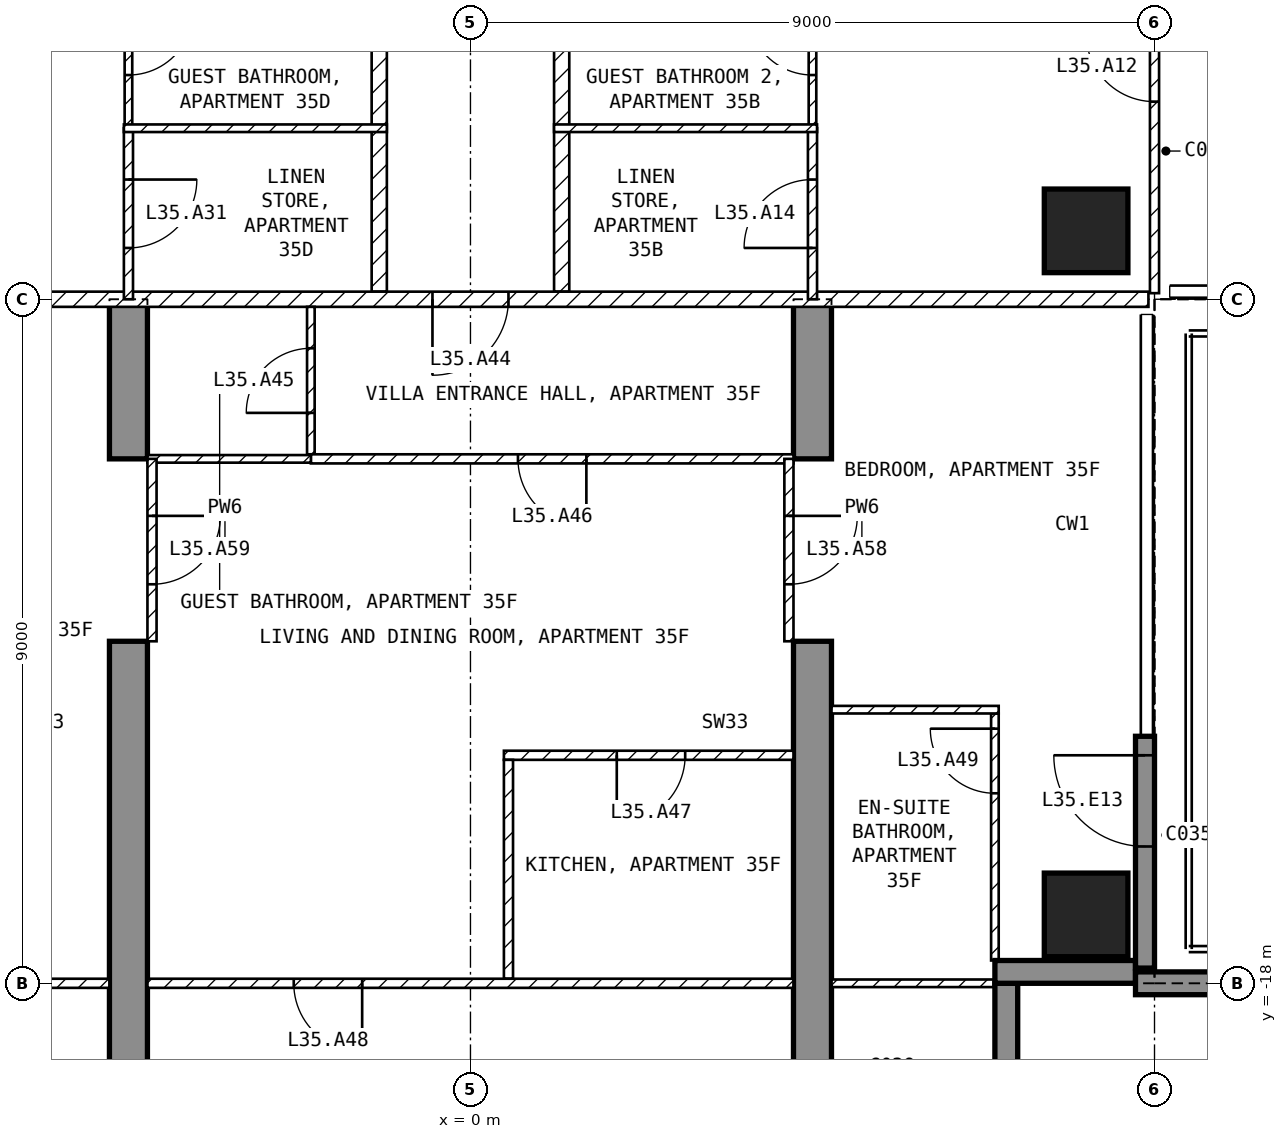
"""IFC4 building model, lengths in metres.
Left out: names, types, materials, properties, quantities, classifications, styles, units other than length and angle.
Written with IfcOpenShell. Run it as: python <this file> out.ifc"""

import sys

from ifc_helpers import new_model, si_unit, direction, frame, frame_2d, origin, origin_2d, place, context, subcontext, project, spatial, polyline, rectangle, outline, extrude, element, fill, save


model = new_model("IFC4")
c1 = context("Model", 3, precision=1e-05, world=origin(), true_north=direction((0.0, 1.0)))
c2 = subcontext(c1, "Body", "Model", "MODEL_VIEW")
j1 = project(units=[si_unit("LENGTHUNIT", "METRE"), si_unit("PLANEANGLEUNIT", "RADIAN")], contexts=[c1])
p1 = place(None, origin())
s1 = spatial("IfcSite", under=j1, at=p1, CompositionType="ELEMENT")
p2 = place(p1, origin())
s2 = spatial("IfcBuilding", under=s1, at=p2, CompositionType="ELEMENT")
p3 = place(p2, frame((0.0, 0.0, 144.4)))
s3 = spatial("IfcBuildingStorey", under=s2, at=p3, CompositionType="ELEMENT", Elevation=144.4)
for number, where, z_axis, x_axis in (
    (1, (8.1, -17.1, -0.25), (0.0, 0.0, 1.0), (1.0, 0.0, 0.0)),
    (2, (8.1, -8.1, -0.25), (0.0, 0.0, 1.0), (1.0, 0.0, 0.0)),
):
    element("IfcColumn", number, at=place(p3, frame(where, z_axis=z_axis, x_axis=x_axis)), inside=s3, PredefinedType="COLUMN", context=c2, shape_type="SweptSolid", body=[
        extrude(rectangle(XDim=1.1, YDim=1.1, at=origin_2d()), origin(), (0.0, 0.0, 1.0), 3.5),
    ])
for number, where, z_axis, x_axis in (
    (3, (-4.75, -20.15, -0.25), (1.0, 0.0, 0.0), (0.0, 1.0, 0.0)),
    (4, (4.25, -20.15, -0.25), (1.0, 0.0, 0.0), (0.0, 1.0, 0.0)),
):
    element("IfcWall", number, at=place(p3, frame(where, z_axis=z_axis, x_axis=x_axis)), inside=s3, PredefinedType="SHEAR", context=c2, shape_type="SweptSolid", body=[
        extrude(outline(polyline([(0.0, 0.0), (6.65, 0.0), (6.65, 2.65), (9.05, 2.65), (9.05, 0.0), (11.15, 0.0), (11.15, 3.5), (0.0, 3.5), (0.0, 0.0)])), origin(), (0.0, 0.0, 1.0), 0.5),
    ])
p4 = place(p3, frame((8.875, -17.8, 0.0), z_axis=(0.0, 0.0, 1.0), x_axis=(0.0, 1.0, 0.0)))
e5 = element("IfcWall", 5, at=p4, inside=s3, PredefinedType="SOLIDWALL", context=c2, shape_type="SweptSolid", body=[
    extrude(rectangle(XDim=3.05, YDim=0.25, at=frame_2d((1.525, 0.0))), origin(), (0.0, 0.0, 1.0), 3.25),
])
p5 = place(p4, frame((1.6, 0.0, 0.0)))
e6 = element("IfcOpeningElement", 6, at=p5, cuts=e5, PredefinedType="OPENING", context=c2, shape_type="SweptSolid", body=[
    extrude(rectangle(XDim=1.2, YDim=2.4, at=frame_2d((0.6, 1.2))), frame((0.0, 0.135, 0.0), z_axis=(0.0, -1.0, 0.0), x_axis=(1.0, 0.0, 0.0)), (0.0, 0.0, 1.0), 0.27),
])
p6 = place(p3, frame((7.05, -19.8, 0.0), z_axis=(0.0, 0.0, 1.0), x_axis=(0.0, 1.0, 0.0)))
e7 = element("IfcWall", 7, at=p6, inside=s3, PredefinedType="SOLIDWALL", context=c2, shape_type="SweptSolid", body=[
    extrude(rectangle(XDim=1.8, YDim=0.3, at=frame_2d((0.9, 0.0))), origin(), (0.0, 0.0, 1.0), 3.25),
])
p7 = place(p3, frame((6.9, -17.85, 0.0), z_axis=(0.0, 0.0, 1.0), x_axis=(1.0, 0.0, 0.0)))
e8 = element("IfcWall", 8, at=p7, inside=s3, PredefinedType="SOLIDWALL", context=c2, shape_type="SweptSolid", body=[
    extrude(rectangle(XDim=1.85, YDim=0.3, at=frame_2d((0.925, 0.0))), origin(), (0.0, 0.0, 1.0), 3.25),
])
p8 = place(p3, frame((8.75, -18.0, 0.0), z_axis=(0.0, 0.0, 1.0), x_axis=(1.0, 0.0, 0.0)))
e9 = element("IfcWall", 9, at=p8, inside=s3, PredefinedType="SOLIDWALL", context=c2, shape_type="SweptSolid", body=[
    extrude(rectangle(XDim=2.99, YDim=0.3, at=frame_2d((1.495, 0.0))), origin(), (0.0, 0.0, 1.0), 3.25),
])
for number, where, z_axis, x_axis in (
    (10, (1.2, -4.6, 0.0), (0.0, 0.0, 1.0), (0.0, -1.0, 0.0)),
    (11, (-1.2, -8.9, 0.0), (0.0, 0.0, 1.0), (0.0, 1.0, 0.0)),
):
    element("IfcWall", number, at=place(p3, frame(where, z_axis=z_axis, x_axis=x_axis)), inside=s3, PredefinedType="PARTITIONING", context=c2, shape_type="SweptSolid", body=[
        extrude(rectangle(XDim=4.3, YDim=0.2, at=frame_2d((2.15, 0.0))), origin(), (0.0, 0.0, 1.0), 3.25),
    ])
p9 = place(p3, frame((8.92, -9.0, 0.0), z_axis=(0.0, 0.0, 1.0), x_axis=(-1.0, 0.0, 0.0)))
e12 = element("IfcWall", 12, at=p9, inside=s3, PredefinedType="PARTITIONING", context=c2, shape_type="SweptSolid", body=[
    extrude(rectangle(XDim=17.84, YDim=0.2, at=frame_2d((8.92, 0.0))), origin(), (0.0, 0.0, 1.0), 3.25),
])
p10 = place(p9, frame((8.42, 0.0, 0.0)))
e13 = element("IfcOpeningElement", 13, at=p10, cuts=e12, PredefinedType="OPENING", context=c2, shape_type="SweptSolid", body=[
    extrude(rectangle(XDim=1.0, YDim=2.1, at=frame_2d((0.5, 1.05))), frame((0.0, 0.11, 0.0), z_axis=(0.0, -1.0, 0.0), x_axis=(1.0, 0.0, 0.0)), (0.0, 0.0, 1.0), 0.22),
])
p11 = place(p3, frame((9.0, -8.92, 0.0), z_axis=(0.0, 0.0, 1.0), x_axis=(0.0, 1.0, 0.0)))
e14 = element("IfcWall", 14, at=p11, inside=s3, PredefinedType="PARTITIONING", context=c2, shape_type="SweptSolid", body=[
    extrude(rectangle(XDim=7.62, YDim=0.12, at=frame_2d((3.81, 0.0))), origin(), (0.0, 0.0, 1.0), 3.25),
])
p12 = place(p11, frame((2.52, 0.0, 0.0)))
e15 = element("IfcOpeningElement", 15, at=p12, cuts=e14, PredefinedType="OPENING", context=c2, shape_type="SweptSolid", body=[
    extrude(rectangle(XDim=0.9, YDim=2.1, at=frame_2d((0.45, 1.05))), frame((0.0, 0.07, 0.0), z_axis=(0.0, -1.0, 0.0), x_axis=(1.0, 0.0, 0.0)), (0.0, 0.0, 1.0), 0.14),
])
p13 = place(p3, frame((4.5, -6.75, 0.0), z_axis=(0.0, 0.0, 1.0), x_axis=(0.0, 1.0, 0.0)))
e16 = element("IfcWall", 16, at=p13, inside=s3, PredefinedType="PARTITIONING", context=c2, shape_type="SweptSolid", body=[
    extrude(rectangle(XDim=2.25, YDim=0.1, at=frame_2d((1.125, 0.0))), origin(), (0.0, 0.0, 1.0), 3.25),
])
p14 = place(p13, frame((0.7, 0.0, 0.0)))
e17 = element("IfcOpeningElement", 17, at=p14, cuts=e16, PredefinedType="OPENING", context=c2, shape_type="SweptSolid", body=[
    extrude(rectangle(XDim=0.85, YDim=2.1, at=frame_2d((0.425, 1.05))), frame((0.0, 0.06, 0.0), z_axis=(0.0, -1.0, 0.0), x_axis=(1.0, 0.0, 0.0)), (0.0, 0.0, 1.0), 0.12),
])
p15 = place(p3, frame((4.5, -9.0, 0.0), z_axis=(0.0, 0.0, 1.0), x_axis=(0.0, 1.0, 0.0)))
e18 = element("IfcWall", 18, at=p15, inside=s3, PredefinedType="PARTITIONING", context=c2, shape_type="SweptSolid", body=[
    extrude(rectangle(XDim=2.25, YDim=0.12, at=frame_2d((1.125, 0.0))), origin(), (0.0, 0.0, 1.0), 3.25),
])
p16 = place(p15, frame((0.675, 0.0, 0.0)))
e19 = element("IfcOpeningElement", 19, at=p16, cuts=e18, PredefinedType="OPENING", context=c2, shape_type="SweptSolid", body=[
    extrude(rectangle(XDim=0.9, YDim=2.1, at=frame_2d((0.45, 1.05))), frame((0.0, 0.07, 0.0), z_axis=(0.0, -1.0, 0.0), x_axis=(1.0, 0.0, 0.0)), (0.0, 0.0, 1.0), 0.14),
])
p17 = place(p3, frame((4.56, -6.75, 0.0), z_axis=(0.0, 0.0, 1.0), x_axis=(-1.0, 0.0, 0.0)))
e20 = element("IfcWall", 20, at=p17, inside=s3, PredefinedType="PARTITIONING", context=c2, shape_type="SweptSolid", body=[
    extrude(rectangle(XDim=3.46, YDim=0.1, at=frame_2d((1.73, 0.0))), origin(), (0.0, 0.0, 1.0), 3.25),
])
p18 = place(p3, frame((-4.5, -4.5, 0.0), z_axis=(0.0, 0.0, 1.0), x_axis=(0.0, -1.0, 0.0)))
e21 = element("IfcWall", 21, at=p18, inside=s3, PredefinedType="PARTITIONING", context=c2, shape_type="SweptSolid", body=[
    extrude(rectangle(XDim=2.25, YDim=0.1, at=frame_2d((1.125, 0.0))), origin(), (0.0, 0.0, 1.0), 3.25),
])
p19 = place(p18, frame((0.7, 0.0, 0.0)))
e22 = element("IfcOpeningElement", 22, at=p19, cuts=e21, PredefinedType="OPENING", context=c2, shape_type="SweptSolid", body=[
    extrude(rectangle(XDim=0.85, YDim=2.1, at=frame_2d((0.425, 1.05))), frame((0.0, 0.06, 0.0), z_axis=(0.0, -1.0, 0.0), x_axis=(1.0, 0.0, 0.0)), (0.0, 0.0, 1.0), 0.12),
])
p20 = place(p3, frame((-4.5, -6.75, 0.0), z_axis=(0.0, 0.0, 1.0), x_axis=(0.0, -1.0, 0.0)))
e23 = element("IfcWall", 23, at=p20, inside=s3, PredefinedType="PARTITIONING", context=c2, shape_type="SweptSolid", body=[
    extrude(rectangle(XDim=2.25, YDim=0.12, at=frame_2d((1.125, 0.0))), origin(), (0.0, 0.0, 1.0), 3.25),
])
p21 = place(p20, frame((0.675, 0.0, 0.0)))
e24 = element("IfcOpeningElement", 24, at=p21, cuts=e23, PredefinedType="OPENING", context=c2, shape_type="SweptSolid", body=[
    extrude(rectangle(XDim=0.9, YDim=2.1, at=frame_2d((0.45, 1.05))), frame((0.0, 0.07, 0.0), z_axis=(0.0, -1.0, 0.0), x_axis=(1.0, 0.0, 0.0)), (0.0, 0.0, 1.0), 0.14),
])
p22 = place(p3, frame((-1.1, -6.75, 0.0), z_axis=(0.0, 0.0, 1.0), x_axis=(-1.0, 0.0, 0.0)))
e25 = element("IfcWall", 25, at=p22, inside=s3, PredefinedType="PARTITIONING", context=c2, shape_type="SweptSolid", body=[
    extrude(rectangle(XDim=3.46, YDim=0.1, at=frame_2d((1.73, 0.0))), origin(), (0.0, 0.0, 1.0), 3.25),
])
p23 = place(p3, frame((-2.1, -11.04, 0.0), z_axis=(0.0, 0.0, 1.0), x_axis=(0.0, 1.0, 0.0)))
e26 = element("IfcWall", 26, at=p23, inside=s3, PredefinedType="PARTITIONING", context=c2, shape_type="SweptSolid", body=[
    extrude(rectangle(XDim=1.94, YDim=0.1, at=frame_2d((0.97, 0.0))), origin(), (0.0, 0.0, 1.0), 3.25),
])
p24 = place(p23, frame((0.545, 0.0, 0.0)))
e27 = element("IfcOpeningElement", 27, at=p24, cuts=e26, PredefinedType="OPENING", context=c2, shape_type="SweptSolid", body=[
    extrude(rectangle(XDim=0.85, YDim=2.1, at=frame_2d((0.425, 1.05))), frame((0.0, 0.06, 0.0), z_axis=(0.0, -1.0, 0.0), x_axis=(1.0, 0.0, 0.0)), (0.0, 0.0, 1.0), 0.12),
])
p25 = place(p3, frame((4.25, -11.1, 0.0), z_axis=(0.0, 0.0, 1.0), x_axis=(-1.0, 0.0, 0.0)))
e28 = element("IfcWall", 28, at=p25, inside=s3, PredefinedType="PARTITIONING", context=c2, shape_type="SweptSolid", body=[
    extrude(rectangle(XDim=6.35, YDim=0.12, at=frame_2d((3.175, 0.0))), origin(), (0.0, 0.0, 1.0), 3.25),
])
p26 = place(p25, frame((2.725, 0.0, 0.0)))
e29 = element("IfcOpeningElement", 29, at=p26, cuts=e28, PredefinedType="OPENING", context=c2, shape_type="SweptSolid", body=[
    extrude(rectangle(XDim=0.9, YDim=2.1, at=frame_2d((0.45, 1.05))), frame((0.0, 0.07, 0.0), z_axis=(0.0, -1.0, 0.0), x_axis=(1.0, 0.0, 0.0)), (0.0, 0.0, 1.0), 0.14),
])
p27 = place(p3, frame((-2.1, -11.1, 0.0), z_axis=(0.0, 0.0, 1.0), x_axis=(-1.0, 0.0, 0.0)))
e30 = element("IfcWall", 30, at=p27, inside=s3, PredefinedType="PARTITIONING", context=c2, shape_type="SweptSolid", body=[
    extrude(rectangle(XDim=2.15, YDim=0.1, at=frame_2d((1.075, 0.0))), origin(), (0.0, 0.0, 1.0), 3.25),
])
p28 = place(p3, frame((4.25, -15.0, 0.0), z_axis=(0.0, 0.0, 1.0), x_axis=(-1.0, 0.0, 0.0)))
e31 = element("IfcWall", 31, at=p28, inside=s3, PredefinedType="PARTITIONING", context=c2, shape_type="SweptSolid", body=[
    extrude(rectangle(XDim=3.81, YDim=0.12, at=frame_2d((1.905, 0.0))), origin(), (0.0, 0.0, 1.0), 3.25),
])
p29 = place(p28, frame((1.425, 0.0, 0.0)))
e32 = element("IfcOpeningElement", 32, at=p29, cuts=e31, PredefinedType="OPENING", context=c2, shape_type="SweptSolid", body=[
    extrude(rectangle(XDim=0.9, YDim=2.1, at=frame_2d((0.45, 1.05))), frame((0.0, 0.07, 0.0), z_axis=(0.0, -1.0, 0.0), x_axis=(1.0, 0.0, 0.0)), (0.0, 0.0, 1.0), 0.14),
])
p30 = place(p3, frame((0.5, -15.06, 0.0), z_axis=(0.0, 0.0, 1.0), x_axis=(0.0, -1.0, 0.0)))
e33 = element("IfcWall", 33, at=p30, inside=s3, PredefinedType="PARTITIONING", context=c2, shape_type="SweptSolid", body=[
    extrude(rectangle(XDim=2.88, YDim=0.12, at=frame_2d((1.44, 0.0))), origin(), (0.0, 0.0, 1.0), 3.25),
])
p31 = place(p3, frame((4.25, -18.0, 0.0), z_axis=(0.0, 0.0, 1.0), x_axis=(-1.0, 0.0, 0.0)))
e34 = element("IfcWall", 34, at=p31, inside=s3, PredefinedType="PARTITIONING", context=c2, shape_type="SweptSolid", body=[
    extrude(rectangle(XDim=8.5, YDim=0.12, at=frame_2d((4.25, 0.0))), origin(), (0.0, 0.0, 1.0), 3.25),
])
p32 = place(p31, frame((5.675, 0.0, 0.0)))
e35 = element("IfcOpeningElement", 35, at=p32, cuts=e34, PredefinedType="OPENING", context=c2, shape_type="SweptSolid", body=[
    extrude(rectangle(XDim=0.9, YDim=2.1, at=frame_2d((0.45, 1.05))), frame((0.0, 0.07, 0.0), z_axis=(0.0, -1.0, 0.0), x_axis=(1.0, 0.0, 0.0)), (0.0, 0.0, 1.0), 0.14),
])
p33 = place(p3, frame((6.9, -17.7, 0.0), z_axis=(0.0, 0.0, 1.0), x_axis=(0.0, 1.0, 0.0)))
e36 = element("IfcWall", 36, at=p33, inside=s3, PredefinedType="PARTITIONING", context=c2, shape_type="SweptSolid", body=[
    extrude(rectangle(XDim=3.25, YDim=0.1, at=frame_2d((1.625, 0.0))), origin(), (0.0, 0.0, 1.0), 3.25),
])
p34 = place(p33, frame((2.2, 0.0, 0.0)))
e37 = element("IfcOpeningElement", 37, at=p34, cuts=e36, PredefinedType="OPENING", context=c2, shape_type="SweptSolid", body=[
    extrude(rectangle(XDim=0.85, YDim=2.1, at=frame_2d((0.425, 1.05))), frame((0.0, 0.06, 0.0), z_axis=(0.0, -1.0, 0.0), x_axis=(1.0, 0.0, 0.0)), (0.0, 0.0, 1.0), 0.12),
])
p35 = place(p3, frame((6.95, -14.4, 0.0), z_axis=(0.0, 0.0, 1.0), x_axis=(-1.0, 0.0, 0.0)))
e38 = element("IfcWall", 38, at=p35, inside=s3, PredefinedType="PARTITIONING", context=c2, shape_type="SweptSolid", body=[
    extrude(rectangle(XDim=2.2, YDim=0.1, at=frame_2d((1.1, 0.0))), origin(), (0.0, 0.0, 1.0), 3.25),
])
p36 = place(p3, frame((7.12, -18.0, 0.0), z_axis=(0.0, 0.0, 1.0), x_axis=(-1.0, 0.0, 0.0)))
e39 = element("IfcWall", 39, at=p36, inside=s3, PredefinedType="PARTITIONING", context=c2, shape_type="SweptSolid", body=[
    extrude(rectangle(XDim=2.37, YDim=0.1, at=frame_2d((1.185, 0.0))), origin(), (0.0, 0.0, 1.0), 3.25),
])
p37 = place(p3, frame((-4.75, -18.0, 0.0), z_axis=(0.0, 0.0, 1.0), x_axis=(-1.0, 0.0, 0.0)))
e40 = element("IfcWall", 40, at=p37, inside=s3, PredefinedType="PARTITIONING", context=c2, shape_type="SweptSolid", body=[
    extrude(rectangle(XDim=2.37, YDim=0.12, at=frame_2d((1.185, 0.0))), origin(), (0.0, 0.0, 1.0), 3.25),
])
p38 = place(p3, frame((4.19, -11.1, 0.0), z_axis=(0.0, 0.0, 1.0), x_axis=(0.0, -1.0, 0.0)))
e41 = element("IfcWall", 41, at=p38, inside=s3, PredefinedType="PARTITIONING", context=c2, shape_type="SweptSolid", body=[
    extrude(rectangle(XDim=2.4, YDim=0.12, at=frame_2d((1.2, 0.0))), origin(), (0.0, 0.0, 1.0), 2.4),
])
p39 = place(p38, frame((0.75, 0.0, 0.0)))
e42 = element("IfcOpeningElement", 42, at=p39, cuts=e41, PredefinedType="OPENING", context=c2, shape_type="SweptSolid", body=[
    extrude(rectangle(XDim=0.9, YDim=2.1, at=frame_2d((0.45, 1.05))), frame((0.0, 0.07, 0.0), z_axis=(0.0, -1.0, 0.0), x_axis=(1.0, 0.0, 0.0)), (0.0, 0.0, 1.0), 0.14),
])
p40 = place(p3, frame((-4.19, -11.1, 0.0), z_axis=(0.0, 0.0, 1.0), x_axis=(0.0, -1.0, 0.0)))
e43 = element("IfcWall", 43, at=p40, inside=s3, PredefinedType="PARTITIONING", context=c2, shape_type="SweptSolid", body=[
    extrude(rectangle(XDim=2.4, YDim=0.12, at=frame_2d((1.2, 0.0))), origin(), (0.0, 0.0, 1.0), 2.4),
])
p41 = place(p40, frame((0.75, 0.0, 0.0)))
e44 = element("IfcOpeningElement", 44, at=p41, cuts=e43, PredefinedType="OPENING", context=c2, shape_type="SweptSolid", body=[
    extrude(rectangle(XDim=0.9, YDim=2.1, at=frame_2d((0.45, 1.05))), frame((0.0, 0.07, 0.0), z_axis=(0.0, -1.0, 0.0), x_axis=(1.0, 0.0, 0.0)), (0.0, 0.0, 1.0), 0.14),
])
p42 = place(p5, origin())
e45 = element("IfcDoor", 45, at=p42, inside=s3, OperationType="SINGLE_SWING_RIGHT", PredefinedType="DOOR", context=c2, shape_type="SweptSolid", body=[
    extrude(rectangle(XDim=1.2, YDim=2.4, at=frame_2d((0.6, 1.2))), frame((0.0, 0.025, 0.0), z_axis=(0.0, -1.0, 0.0), x_axis=(1.0, 0.0, 0.0)), (0.0, 0.0, 1.0), 0.05),
])
fill(e6, e45)
p43 = place(p14, origin())
e46 = element("IfcDoor", 46, at=p43, inside=s3, OperationType="SINGLE_SWING_RIGHT", PredefinedType="DOOR", context=c2, shape_type="SweptSolid", body=[
    extrude(rectangle(XDim=0.85, YDim=2.1, at=frame_2d((0.425, 1.05))), frame((0.0, 0.025, 0.0), z_axis=(0.0, -1.0, 0.0), x_axis=(1.0, 0.0, 0.0)), (0.0, 0.0, 1.0), 0.05),
])
fill(e17, e46)
p44 = place(p12, origin())
e47 = element("IfcDoor", 47, at=p44, inside=s3, OperationType="SINGLE_SWING_RIGHT", PredefinedType="DOOR", context=c2, shape_type="SweptSolid", body=[
    extrude(rectangle(XDim=0.9, YDim=2.1, at=frame_2d((0.45, 1.05))), frame((0.0, 0.025, 0.0), z_axis=(0.0, -1.0, 0.0), x_axis=(1.0, 0.0, 0.0)), (0.0, 0.0, 1.0), 0.05),
])
fill(e15, e47)
p45 = place(p16, origin())
e48 = element("IfcDoor", 48, at=p45, inside=s3, OperationType="SINGLE_SWING_LEFT", PredefinedType="DOOR", context=c2, shape_type="SweptSolid", body=[
    extrude(rectangle(XDim=0.9, YDim=2.1, at=frame_2d((0.45, 1.05))), frame((0.0, 0.025, 0.0), z_axis=(0.0, -1.0, 0.0), x_axis=(1.0, 0.0, 0.0)), (0.0, 0.0, 1.0), 0.05),
])
fill(e19, e48)
p46 = place(p19, origin())
e49 = element("IfcDoor", 49, at=p46, inside=s3, OperationType="SINGLE_SWING_LEFT", PredefinedType="DOOR", context=c2, shape_type="SweptSolid", body=[
    extrude(rectangle(XDim=0.85, YDim=2.1, at=frame_2d((0.425, 1.05))), frame((0.0, 0.025, 0.0), z_axis=(0.0, -1.0, 0.0), x_axis=(1.0, 0.0, 0.0)), (0.0, 0.0, 1.0), 0.05),
])
fill(e22, e49)
p47 = place(p21, origin())
e50 = element("IfcDoor", 50, at=p47, inside=s3, OperationType="SINGLE_SWING_LEFT", PredefinedType="DOOR", context=c2, shape_type="SweptSolid", body=[
    extrude(rectangle(XDim=0.9, YDim=2.1, at=frame_2d((0.45, 1.05))), frame((0.0, 0.025, 0.0), z_axis=(0.0, -1.0, 0.0), x_axis=(1.0, 0.0, 0.0)), (0.0, 0.0, 1.0), 0.05),
])
fill(e24, e50)
p48 = place(p10, origin())
e51 = element("IfcDoor", 51, at=p48, inside=s3, OperationType="SINGLE_SWING_RIGHT", PredefinedType="DOOR", context=c2, shape_type="SweptSolid", body=[
    extrude(rectangle(XDim=1.0, YDim=2.1, at=frame_2d((0.5, 1.05))), frame((0.0, 0.025, 0.0), z_axis=(0.0, -1.0, 0.0), x_axis=(1.0, 0.0, 0.0)), (0.0, 0.0, 1.0), 0.05),
])
fill(e13, e51)
p49 = place(p24, origin())
e52 = element("IfcDoor", 52, at=p49, inside=s3, OperationType="SINGLE_SWING_LEFT", PredefinedType="DOOR", context=c2, shape_type="SweptSolid", body=[
    extrude(rectangle(XDim=0.85, YDim=2.1, at=frame_2d((0.425, 1.05))), frame((0.0, 0.025, 0.0), z_axis=(0.0, -1.0, 0.0), x_axis=(1.0, 0.0, 0.0)), (0.0, 0.0, 1.0), 0.05),
])
fill(e27, e52)
p50 = place(p26, origin())
e53 = element("IfcDoor", 53, at=p50, inside=s3, OperationType="SINGLE_SWING_LEFT", PredefinedType="DOOR", context=c2, shape_type="SweptSolid", body=[
    extrude(rectangle(XDim=0.9, YDim=2.1, at=frame_2d((0.45, 1.05))), frame((0.0, 0.025, 0.0), z_axis=(0.0, -1.0, 0.0), x_axis=(1.0, 0.0, 0.0)), (0.0, 0.0, 1.0), 0.05),
])
fill(e29, e53)
p51 = place(p29, origin())
e54 = element("IfcDoor", 54, at=p51, inside=s3, OperationType="SINGLE_SWING_RIGHT", PredefinedType="DOOR", context=c2, shape_type="SweptSolid", body=[
    extrude(rectangle(XDim=0.9, YDim=2.1, at=frame_2d((0.45, 1.05))), frame((0.0, 0.025, 0.0), z_axis=(0.0, -1.0, 0.0), x_axis=(1.0, 0.0, 0.0)), (0.0, 0.0, 1.0), 0.05),
])
fill(e32, e54)
p52 = place(p32, origin())
e55 = element("IfcDoor", 55, at=p52, inside=s3, OperationType="SINGLE_SWING_LEFT", PredefinedType="DOOR", context=c2, shape_type="SweptSolid", body=[
    extrude(rectangle(XDim=0.9, YDim=2.1, at=frame_2d((0.45, 1.05))), frame((0.0, 0.025, 0.0), z_axis=(0.0, -1.0, 0.0), x_axis=(1.0, 0.0, 0.0)), (0.0, 0.0, 1.0), 0.05),
])
fill(e35, e55)
p53 = place(p34, origin())
e56 = element("IfcDoor", 56, at=p53, inside=s3, OperationType="SINGLE_SWING_RIGHT", PredefinedType="DOOR", context=c2, shape_type="SweptSolid", body=[
    extrude(rectangle(XDim=0.85, YDim=2.1, at=frame_2d((0.425, 1.05))), frame((0.0, 0.025, 0.0), z_axis=(0.0, -1.0, 0.0), x_axis=(1.0, 0.0, 0.0)), (0.0, 0.0, 1.0), 0.05),
])
fill(e37, e56)
p54 = place(p39, origin())
e57 = element("IfcDoor", 57, at=p54, inside=s3, OperationType="SINGLE_SWING_LEFT", PredefinedType="DOOR", context=c2, shape_type="SweptSolid", body=[
    extrude(rectangle(XDim=0.9, YDim=2.1, at=frame_2d((0.45, 1.05))), frame((0.0, 0.025, 0.0), z_axis=(0.0, -1.0, 0.0), x_axis=(1.0, 0.0, 0.0)), (0.0, 0.0, 1.0), 0.05),
])
fill(e42, e57)
p55 = place(p41, origin())
e58 = element("IfcDoor", 58, at=p55, inside=s3, OperationType="SINGLE_SWING_LEFT", PredefinedType="DOOR", context=c2, shape_type="SweptSolid", body=[
    extrude(rectangle(XDim=0.9, YDim=2.1, at=frame_2d((0.45, 1.05))), frame((0.0, 0.025, 0.0), z_axis=(0.0, -1.0, 0.0), x_axis=(1.0, 0.0, 0.0)), (0.0, 0.0, 1.0), 0.05),
])
fill(e44, e58)
save(model, sys.argv[1])
